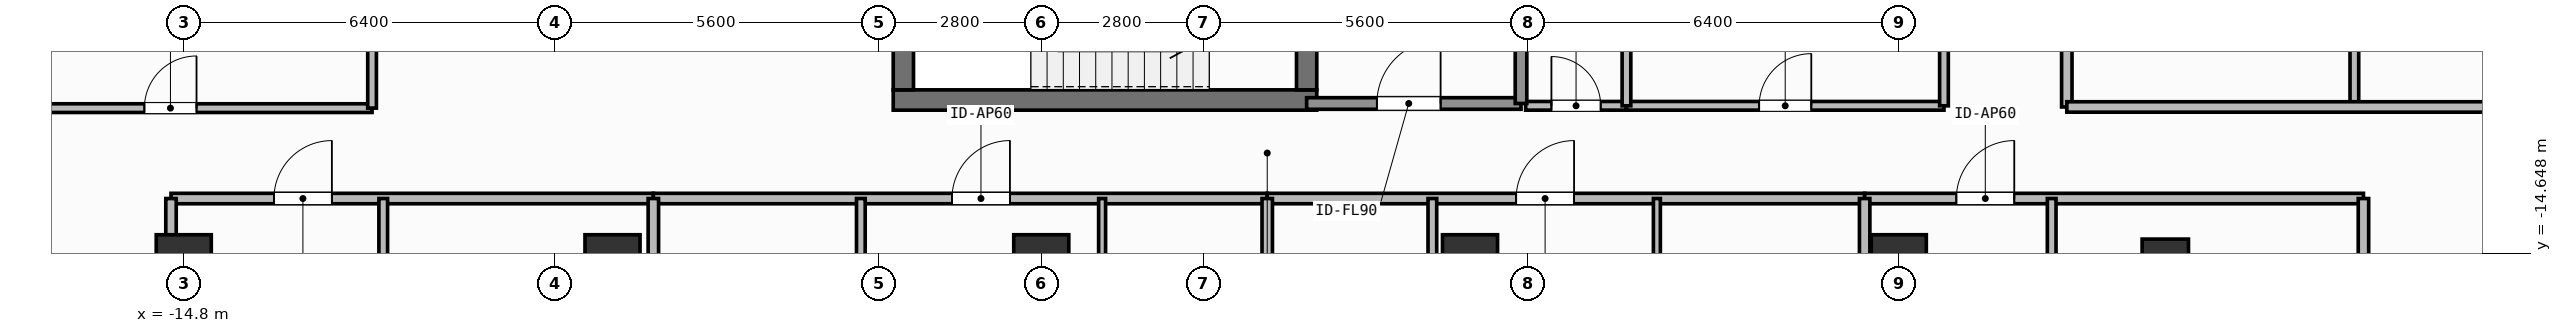
"""IFC4 building model, lengths in metres.
Left out: names, types, materials, properties, quantities, classifications, styles, units other than length and angle.
Written with IfcOpenShell. Run it as: python <this file> out.ifc"""

import sys

from ifc_helpers import new_model, si_unit, direction, frame, frame_2d, origin, origin_2d, place, context, subcontext, project, spatial, rectangle, hollow_rectangle, extrude, element, fill, save


model = new_model("IFC4")
c1 = context("Model", 3, precision=1e-05, world=origin(), true_north=direction((0.0, 1.0)))
c2 = subcontext(c1, "Body", "Model", "MODEL_VIEW")
j1 = project(units=[si_unit("LENGTHUNIT", "METRE"), si_unit("PLANEANGLEUNIT", "RADIAN")], contexts=[c1])
p1 = place(None, origin())
s1 = spatial("IfcSite", under=j1, at=p1, CompositionType="ELEMENT")
p2 = place(p1, origin())
s2 = spatial("IfcBuilding", under=s1, at=p2, CompositionType="ELEMENT")
p3 = place(p2, frame((0.0, 0.0, 250.8)))
s3 = spatial("IfcBuildingStorey", under=s2, at=p3, CompositionType="ELEMENT", Elevation=250.8)
p4 = place(p3, frame((-2.555, -12.0, 0.0), z_axis=(0.0, 0.0, 1.0), x_axis=(1.0, 0.0, 0.0)))
e1 = element("IfcWall", 1, at=p4, inside=s3, PredefinedType="SHEAR", context=c2, shape_type="SweptSolid", body=[
    extrude(rectangle(XDim=7.31, YDim=0.35, at=frame_2d((3.655, 0.0))), origin(), (0.0, 0.0, 1.0), 3.9),
])
p5 = place(p3, frame((-2.38, -11.825, 0.0), z_axis=(0.0, 0.0, 1.0), x_axis=(0.0, 1.0, 0.0)))
e2 = element("IfcWall", 2, at=p5, inside=s3, PredefinedType="SHEAR", context=c2, shape_type="SweptSolid", body=[
    extrude(rectangle(XDim=2.925, YDim=0.35, at=frame_2d((1.462, 0.0))), origin(), (0.0, 0.0, 1.0), 3.9),
])
p6 = place(p3, frame((4.58, -8.9, 0.0), z_axis=(0.0, 0.0, 1.0), x_axis=(0.0, -1.0, 0.0)))
e3 = element("IfcWall", 3, at=p6, inside=s3, PredefinedType="SHEAR", context=c2, shape_type="SweptSolid", body=[
    extrude(rectangle(XDim=2.925, YDim=0.35, at=frame_2d((1.462, 0.0))), origin(), (0.0, 0.0, 1.0), 3.9),
])
p7 = place(p6, frame((0.913, 0.0, 0.0)))
e4 = element("IfcOpeningElement", 4, at=p7, cuts=e3, PredefinedType="OPENING", context=c2, shape_type="SweptSolid", body=[
    extrude(rectangle(XDim=1.1, YDim=2.15, at=frame_2d((0.55, 1.075))), frame((0.0, 0.185, 0.0), z_axis=(0.0, -1.0, 0.0), x_axis=(1.0, 0.0, 0.0)), (0.0, 0.0, 1.0), 0.37),
])
for number, where, z_axis, x_axis in (
    (5, (-14.8, -14.8, 0.0), (0.0, 0.0, 1.0), (1.0, 0.0, 0.0)),
    (6, (-7.4, -14.8, 0.0), (0.0, 0.0, 1.0), (1.0, 0.0, 0.0)),
    (7, (0.0, -14.8, 0.0), (0.0, 0.0, 1.0), (1.0, 0.0, 0.0)),
    (8, (7.4, -14.8, 0.0), (0.0, 0.0, 1.0), (1.0, 0.0, 0.0)),
    (9, (14.8, -14.8, 0.0), (0.0, 0.0, 1.0), (1.0, 0.0, 0.0)),
):
    element("IfcColumn", number, at=place(p3, frame(where, z_axis=z_axis, x_axis=x_axis)), inside=s3, PredefinedType="COLUMN", context=c2, shape_type="SweptSolid", body=[
        extrude(rectangle(XDim=0.95, YDim=0.95, at=origin_2d()), origin(), (0.0, 0.0, 1.0), 3.9),
    ])
p8 = place(p3, frame((19.4, -14.8, 0.0), z_axis=(0.0, 0.0, 1.0), x_axis=(1.0, 0.0, 0.0)))
e10 = element("IfcColumn", 10, at=p8, inside=s3, PredefinedType="COLUMN", context=c2, shape_type="SweptSolid", body=[
    extrude(hollow_rectangle(XDim=0.8, YDim=0.8, WallThickness=0.036, at=origin_2d()), origin(), (0.0, 0.0, 1.0), 3.9),
])
p9 = place(p3, frame((4.58, -12.06, 0.0), z_axis=(0.0, 0.0, 1.0), x_axis=(1.0, 0.0, 0.0)))
e11 = element("IfcWall", 11, at=p9, inside=s3, PredefinedType="SOLIDWALL", context=c2, shape_type="SweptSolid", body=[
    extrude(rectangle(XDim=3.7, YDim=0.2, at=frame_2d((1.85, 0.0))), origin(), (0.0, 0.0, 1.0), 3.62),
])
p10 = place(p9, frame((1.212, 0.0, 0.0)))
e12 = element("IfcOpeningElement", 12, at=p10, cuts=e11, PredefinedType="OPENING", context=c2, shape_type="SweptSolid", body=[
    extrude(rectangle(XDim=1.1, YDim=2.15, at=frame_2d((0.55, 1.075))), frame((0.0, 0.11, 0.0), z_axis=(0.0, -1.0, 0.0), x_axis=(1.0, 0.0, 0.0)), (0.0, 0.0, 1.0), 0.22),
])
p11 = place(p3, frame((8.36, -12.1, 0.0), z_axis=(0.0, 0.0, 1.0), x_axis=(1.0, 0.0, 0.0)))
e13 = element("IfcWall", 13, at=p11, inside=s3, PredefinedType="PARTITIONING", context=c2, shape_type="SweptSolid", body=[
    extrude(rectangle(XDim=1.74, YDim=0.15, at=frame_2d((0.87, 0.0))), origin(), (0.0, 0.0, 1.0), 3.62),
])
p12 = place(p11, frame((0.445, 0.0, 0.0)))
e14 = element("IfcOpeningElement", 14, at=p12, cuts=e13, PredefinedType="OPENING", context=c2, shape_type="SweptSolid", body=[
    extrude(rectangle(XDim=0.85, YDim=2.1, at=frame_2d((0.425, 1.05))), frame((0.0, 0.085, 0.0), z_axis=(0.0, -1.0, 0.0), x_axis=(1.0, 0.0, 0.0)), (0.0, 0.0, 1.0), 0.17),
])
p13 = place(p3, frame((10.1, -12.1, 0.0), z_axis=(0.0, 0.0, 1.0), x_axis=(1.0, 0.0, 0.0)))
e15 = element("IfcWall", 15, at=p13, inside=s3, PredefinedType="PARTITIONING", context=c2, shape_type="SweptSolid", body=[
    extrude(rectangle(XDim=5.48, YDim=0.15, at=frame_2d((2.74, 0.0))), origin(), (0.0, 0.0, 1.0), 3.62),
])
p14 = place(p13, frame((2.29, 0.0, 0.0)))
e16 = element("IfcOpeningElement", 16, at=p14, cuts=e15, PredefinedType="OPENING", context=c2, shape_type="SweptSolid", body=[
    extrude(rectangle(XDim=0.9, YDim=2.1, at=frame_2d((0.45, 1.05))), frame((0.0, 0.085, 0.0), z_axis=(0.0, -1.0, 0.0), x_axis=(1.0, 0.0, 0.0)), (0.0, 0.0, 1.0), 0.17),
])
p15 = place(p3, frame((-15.02, -13.7, 0.0), z_axis=(0.0, 0.0, 1.0), x_axis=(1.0, 0.0, 0.0)))
e17 = element("IfcWall", 17, at=p15, inside=s3, PredefinedType="PARTITIONING", context=c2, shape_type="SweptSolid", body=[
    extrude(rectangle(XDim=8.325, YDim=0.18, at=frame_2d((4.163, 0.0))), origin(), (0.0, 0.0, 1.0), 3.62),
])
p16 = place(p15, frame((1.777, 0.0, 0.0)))
e18 = element("IfcOpeningElement", 18, at=p16, cuts=e17, PredefinedType="OPENING", context=c2, shape_type="SweptSolid", body=[
    extrude(rectangle(XDim=1.0, YDim=2.2, at=frame_2d((0.5, 1.1))), frame((0.0, 0.1, 0.0), z_axis=(0.0, -1.0, 0.0), x_axis=(1.0, 0.0, 0.0)), (0.0, 0.0, 1.0), 0.2),
])
p17 = place(p3, frame((-11.357, -20.422, 0.0), z_axis=(0.0, 0.0, 1.0), x_axis=(0.0, 1.0, 0.0)))
e19 = element("IfcWall", 19, at=p17, inside=s3, PredefinedType="PARTITIONING", context=c2, shape_type="SweptSolid", body=[
    extrude(rectangle(XDim=6.722, YDim=0.15, at=frame_2d((3.361, 0.0))), origin(), (0.0, 0.0, 1.0), 3.62),
])
p18 = place(p17, frame((2.846, 0.0, 0.0)))
e20 = element("IfcOpeningElement", 20, at=p18, cuts=e19, PredefinedType="OPENING", context=c2, shape_type="SweptSolid", body=[
    extrude(rectangle(XDim=0.85, YDim=2.1, at=frame_2d((0.425, 1.05))), frame((0.0, 0.085, 0.0), z_axis=(0.0, -1.0, 0.0), x_axis=(1.0, 0.0, 0.0)), (0.0, 0.0, 1.0), 0.17),
])
p19 = place(p3, frame((-6.695, -13.7, 0.0), z_axis=(0.0, 0.0, 1.0), x_axis=(1.0, 0.0, 0.0)))
e21 = element("IfcWall", 21, at=p19, inside=s3, PredefinedType="PARTITIONING", context=c2, shape_type="SweptSolid", body=[
    extrude(rectangle(XDim=10.595, YDim=0.18, at=frame_2d((5.297, 0.0))), origin(), (0.0, 0.0, 1.0), 3.62),
])
p20 = place(p19, frame((5.154, 0.0, 0.0)))
e22 = element("IfcOpeningElement", 22, at=p20, cuts=e21, PredefinedType="OPENING", context=c2, shape_type="SweptSolid", body=[
    extrude(rectangle(XDim=1.0, YDim=2.2, at=frame_2d((0.5, 1.1))), frame((0.0, 0.1, 0.0), z_axis=(0.0, -1.0, 0.0), x_axis=(1.0, 0.0, 0.0)), (0.0, 0.0, 1.0), 0.2),
])
p21 = place(p3, frame((-3.114, -24.39, 0.0), z_axis=(0.0, 0.0, 1.0), x_axis=(0.0, 1.0, 0.0)))
e23 = element("IfcWall", 23, at=p21, inside=s3, PredefinedType="PARTITIONING", context=c2, shape_type="SweptSolid", body=[
    extrude(rectangle(XDim=10.69, YDim=0.15, at=frame_2d((5.345, 0.0))), origin(), (0.0, 0.0, 1.0), 3.62),
])
p22 = place(p21, frame((4.83, 0.0, 0.0)))
e24 = element("IfcOpeningElement", 24, at=p22, cuts=e23, PredefinedType="OPENING", context=c2, shape_type="SweptSolid", body=[
    extrude(rectangle(XDim=0.85, YDim=2.1, at=frame_2d((0.425, 1.05))), frame((0.0, 0.085, 0.0), z_axis=(0.0, -1.0, 0.0), x_axis=(1.0, 0.0, 0.0)), (0.0, 0.0, 1.0), 0.17),
])
p23 = place(p3, frame((1.05, -21.183, 0.0), z_axis=(0.0, 0.0, 1.0), x_axis=(0.0, 1.0, 0.0)))
e25 = element("IfcWall", 25, at=p23, inside=s3, PredefinedType="PARTITIONING", context=c2, shape_type="SweptSolid", body=[
    extrude(rectangle(XDim=7.483, YDim=0.12, at=frame_2d((3.742, 0.0))), origin(), (0.0, 0.0, 1.0), 3.62),
])
p24 = place(p23, frame((3.316, 0.0, 0.0)))
e26 = element("IfcOpeningElement", 26, at=p24, cuts=e25, PredefinedType="OPENING", context=c2, shape_type="SweptSolid", body=[
    extrude(rectangle(XDim=0.85, YDim=2.1, at=frame_2d((0.425, 1.05))), frame((0.0, 0.07, 0.0), z_axis=(0.0, -1.0, 0.0), x_axis=(1.0, 0.0, 0.0)), (0.0, 0.0, 1.0), 0.14),
])
p25 = place(p3, frame((3.9, -13.7, 0.0), z_axis=(0.0, 0.0, 1.0), x_axis=(1.0, 0.0, 0.0)))
e27 = element("IfcWall", 27, at=p25, inside=s3, PredefinedType="PARTITIONING", context=c2, shape_type="SweptSolid", body=[
    extrude(rectangle(XDim=10.311, YDim=0.18, at=frame_2d((5.156, 0.0))), origin(), (0.0, 0.0, 1.0), 3.62),
])
p26 = place(p25, frame((4.296, 0.0, 0.0)))
e28 = element("IfcOpeningElement", 28, at=p26, cuts=e27, PredefinedType="OPENING", context=c2, shape_type="SweptSolid", body=[
    extrude(rectangle(XDim=1.0, YDim=2.2, at=frame_2d((0.5, 1.1))), frame((0.0, 0.1, 0.0), z_axis=(0.0, -1.0, 0.0), x_axis=(1.0, 0.0, 0.0)), (0.0, 0.0, 1.0), 0.2),
])
p27 = place(p3, frame((6.75, -24.39, 0.0), z_axis=(0.0, 0.0, 1.0), x_axis=(0.0, 1.0, 0.0)))
e29 = element("IfcWall", 29, at=p27, inside=s3, PredefinedType="PARTITIONING", context=c2, shape_type="SweptSolid", body=[
    extrude(rectangle(XDim=10.69, YDim=0.15, at=frame_2d((5.345, 0.0))), origin(), (0.0, 0.0, 1.0), 3.62),
])
p28 = place(p27, frame((5.369, 0.0, 0.0)))
e30 = element("IfcOpeningElement", 30, at=p28, cuts=e29, PredefinedType="OPENING", context=c2, shape_type="SweptSolid", body=[
    extrude(rectangle(XDim=0.85, YDim=2.1, at=frame_2d((0.425, 1.05))), frame((0.0, 0.085, 0.0), z_axis=(0.0, -1.0, 0.0), x_axis=(1.0, 0.0, 0.0)), (0.0, 0.0, 1.0), 0.17),
])
p29 = place(p3, frame((10.625, -21.183, 0.0), z_axis=(0.0, 0.0, 1.0), x_axis=(0.0, 1.0, 0.0)))
e31 = element("IfcWall", 31, at=p29, inside=s3, PredefinedType="PARTITIONING", context=c2, shape_type="SweptSolid", body=[
    extrude(rectangle(XDim=7.483, YDim=0.12, at=frame_2d((3.742, 0.0))), origin(), (0.0, 0.0, 1.0), 3.62),
])
p30 = place(p29, frame((3.316, 0.0, 0.0)))
e32 = element("IfcOpeningElement", 32, at=p30, cuts=e31, PredefinedType="OPENING", context=c2, shape_type="SweptSolid", body=[
    extrude(rectangle(XDim=0.85, YDim=2.1, at=frame_2d((0.425, 1.05))), frame((0.0, 0.07, 0.0), z_axis=(0.0, -1.0, 0.0), x_axis=(1.0, 0.0, 0.0)), (0.0, 0.0, 1.0), 0.14),
])
p31 = place(p3, frame((14.211, -13.7, 0.0), z_axis=(0.0, 0.0, 1.0), x_axis=(1.0, 0.0, 0.0)))
e33 = element("IfcWall", 33, at=p31, inside=s3, PredefinedType="PARTITIONING", context=c2, shape_type="SweptSolid", body=[
    extrude(rectangle(XDim=8.609, YDim=0.18, at=frame_2d((4.305, 0.0))), origin(), (0.0, 0.0, 1.0), 3.62),
])
p32 = place(p31, frame((1.582, 0.0, 0.0)))
e34 = element("IfcOpeningElement", 34, at=p32, cuts=e33, PredefinedType="OPENING", context=c2, shape_type="SweptSolid", body=[
    extrude(rectangle(XDim=1.0, YDim=2.2, at=frame_2d((0.5, 1.1))), frame((0.0, 0.1, 0.0), z_axis=(0.0, -1.0, 0.0), x_axis=(1.0, 0.0, 0.0)), (0.0, 0.0, 1.0), 0.2),
])
p33 = place(p3, frame((17.439, -21.468, 0.0), z_axis=(0.0, 0.0, 1.0), x_axis=(0.0, 1.0, 0.0)))
e35 = element("IfcWall", 35, at=p33, inside=s3, PredefinedType="PARTITIONING", context=c2, shape_type="SweptSolid", body=[
    extrude(rectangle(XDim=7.768, YDim=0.15, at=frame_2d((3.884, 0.0))), origin(), (0.0, 0.0, 1.0), 3.62),
])
p34 = place(p33, frame((3.37, 0.0, 0.0)))
e36 = element("IfcOpeningElement", 36, at=p34, cuts=e35, PredefinedType="OPENING", context=c2, shape_type="SweptSolid", body=[
    extrude(rectangle(XDim=0.85, YDim=2.1, at=frame_2d((0.425, 1.05))), frame((0.0, 0.085, 0.0), z_axis=(0.0, -1.0, 0.0), x_axis=(1.0, 0.0, 0.0)), (0.0, 0.0, 1.0), 0.17),
])
p35 = place(p3, frame((-18.33, -12.14, 0.0), z_axis=(0.0, 0.0, 1.0), x_axis=(1.0, 0.0, 0.0)))
e37 = element("IfcWall", 37, at=p35, inside=s3, PredefinedType="PARTITIONING", context=c2, shape_type="SweptSolid", body=[
    extrude(rectangle(XDim=6.78, YDim=0.15, at=frame_2d((3.39, 0.0))), origin(), (0.0, 0.0, 1.0), 3.62),
])
p36 = place(p35, frame((2.85, 0.0, 0.0)))
e38 = element("IfcOpeningElement", 38, at=p36, cuts=e37, PredefinedType="OPENING", context=c2, shape_type="SweptSolid", body=[
    extrude(rectangle(XDim=0.9, YDim=2.1, at=frame_2d((0.45, 1.05))), frame((0.0, 0.085, 0.0), z_axis=(0.0, -1.0, 0.0), x_axis=(1.0, 0.0, 0.0)), (0.0, 0.0, 1.0), 0.17),
])
p37 = place(p3, frame((17.7, -12.12, 0.0), z_axis=(0.0, 0.0, 1.0), x_axis=(0.0, 1.0, 0.0)))
e39 = element("IfcWall", 39, at=p37, inside=s3, PredefinedType="PARTITIONING", context=c2, shape_type="SweptSolid", body=[
    extrude(rectangle(XDim=23.55, YDim=0.18, at=frame_2d((11.775, 0.0))), origin(), (0.0, 0.0, 1.0), 3.62),
])
p38 = place(p37, frame((11.454, 0.0, 0.0)))
e40 = element("IfcOpeningElement", 40, at=p38, cuts=e39, PredefinedType="OPENING", context=c2, shape_type="SweptSolid", body=[
    extrude(rectangle(XDim=1.0, YDim=2.2, at=frame_2d((0.5, 1.1))), frame((0.0, 0.1, 0.0), z_axis=(0.0, -1.0, 0.0), x_axis=(1.0, 0.0, 0.0)), (0.0, 0.0, 1.0), 0.2),
])
p39 = place(p3, frame((8.28, -12.06, 0.0), z_axis=(0.0, 0.0, 1.0), x_axis=(0.0, 1.0, 0.0)))
e41 = element("IfcWall", 41, at=p39, inside=s3, PredefinedType="SOLIDWALL", context=c2, shape_type="SweptSolid", body=[
    extrude(rectangle(XDim=3.335, YDim=0.2, at=frame_2d((1.667, 0.0))), origin(), (0.0, 0.0, 1.0), 3.62),
])
p40 = place(p3, frame((10.1, -12.1, 0.0), z_axis=(0.0, 0.0, 1.0), x_axis=(0.0, 1.0, 0.0)))
e42 = element("IfcWall", 42, at=p40, inside=s3, PredefinedType="PARTITIONING", context=c2, shape_type="SweptSolid", body=[
    extrude(rectangle(XDim=2.35, YDim=0.15, at=frame_2d((1.175, 0.0))), origin(), (0.0, 0.0, 1.0), 3.62),
])
p41 = place(p3, frame((15.58, -12.1, 0.0), z_axis=(0.0, 0.0, 1.0), x_axis=(0.0, 1.0, 0.0)))
e43 = element("IfcWall", 43, at=p41, inside=s3, PredefinedType="PARTITIONING", context=c2, shape_type="SweptSolid", body=[
    extrude(rectangle(XDim=6.25, YDim=0.15, at=frame_2d((3.125, 0.0))), origin(), (0.0, 0.0, 1.0), 3.62),
])
for number, where, z_axis, x_axis in (
    (44, (-6.695, -28.63, 0.0), (0.0, 0.0, 1.0), (0.0, 1.0, 0.0)),
    (45, (3.9, -28.63, 0.0), (0.0, 0.0, 1.0), (0.0, 1.0, 0.0)),
    (46, (14.211, -28.63, 0.0), (0.0, 0.0, 1.0), (0.0, 1.0, 0.0)),
):
    element("IfcWall", number, at=place(p3, frame(where, z_axis=z_axis, x_axis=x_axis)), inside=s3, PredefinedType="PARTITIONING", context=c2, shape_type="SweptSolid", body=[
        extrude(rectangle(XDim=14.93, YDim=0.18, at=frame_2d((7.465, 0.0))), origin(), (0.0, 0.0, 1.0), 3.62),
    ])
for number, where, z_axis, x_axis in (
    (47, (-15.02, -27.51, 0.0), (0.0, 0.0, 1.0), (0.0, 1.0, 0.0)),
    (48, (22.82, -27.51, 0.0), (0.0, 0.0, 1.0), (0.0, 1.0, 0.0)),
):
    element("IfcWall", number, at=place(p3, frame(where, z_axis=z_axis, x_axis=x_axis)), inside=s3, PredefinedType="PARTITIONING", context=c2, shape_type="SweptSolid", body=[
        extrude(rectangle(XDim=13.81, YDim=0.18, at=frame_2d((6.905, 0.0))), origin(), (0.0, 0.0, 1.0), 3.62),
    ])
p42 = place(p3, frame((-11.55, -12.14, 0.0), z_axis=(0.0, 0.0, 1.0), x_axis=(0.0, 1.0, 0.0)))
e49 = element("IfcWall", 49, at=p42, inside=s3, PredefinedType="PARTITIONING", context=c2, shape_type="SweptSolid", body=[
    extrude(rectangle(XDim=16.24, YDim=0.15, at=frame_2d((8.12, 0.0))), origin(), (0.0, 0.0, 1.0), 3.62),
])
p43 = place(p3, frame((22.663, -12.12, 0.0), z_axis=(0.0, 0.0, 1.0), x_axis=(0.0, 1.0, 0.0)))
e50 = element("IfcWall", 50, at=p43, inside=s3, PredefinedType="PARTITIONING", context=c2, shape_type="SweptSolid", body=[
    extrude(rectangle(XDim=6.704, YDim=0.15, at=frame_2d((3.352, 0.0))), origin(), (0.0, 0.0, 1.0), 3.62),
])
p44 = place(p3, frame((17.7, -12.12, 0.0), z_axis=(0.0, 0.0, 1.0), x_axis=(1.0, 0.0, 0.0)))
e51 = element("IfcWall", 51, at=p44, inside=s3, PredefinedType="PARTITIONING", context=c2, shape_type="SweptSolid", body=[
    extrude(rectangle(XDim=8.43, YDim=0.18, at=frame_2d((4.215, 0.0))), origin(), (0.0, 0.0, 1.0), 3.62),
])
p45 = place(p10, origin())
e52 = element("IfcDoor", 52, at=p45, inside=s3, OperationType="SINGLE_SWING_RIGHT", PredefinedType="DOOR", context=c2, shape_type="SweptSolid", body=[
    extrude(rectangle(XDim=1.1, YDim=2.15, at=frame_2d((0.55, 1.075))), frame((0.0, 0.025, 0.0), z_axis=(0.0, -1.0, 0.0), x_axis=(1.0, 0.0, 0.0)), (0.0, 0.0, 1.0), 0.05),
])
fill(e12, e52)
p46 = place(p12, origin())
e53 = element("IfcDoor", 53, at=p46, inside=s3, OperationType="SINGLE_SWING_LEFT", PredefinedType="DOOR", context=c2, shape_type="SweptSolid", body=[
    extrude(rectangle(XDim=0.85, YDim=2.1, at=frame_2d((0.425, 1.05))), frame((0.0, 0.025, 0.0), z_axis=(0.0, -1.0, 0.0), x_axis=(1.0, 0.0, 0.0)), (0.0, 0.0, 1.0), 0.05),
])
fill(e14, e53)
p47 = place(p14, origin())
e54 = element("IfcDoor", 54, at=p47, inside=s3, OperationType="SINGLE_SWING_RIGHT", PredefinedType="DOOR", context=c2, shape_type="SweptSolid", body=[
    extrude(rectangle(XDim=0.9, YDim=2.1, at=frame_2d((0.45, 1.05))), frame((0.0, 0.025, 0.0), z_axis=(0.0, -1.0, 0.0), x_axis=(1.0, 0.0, 0.0)), (0.0, 0.0, 1.0), 0.05),
])
fill(e16, e54)
p48 = place(p16, origin())
e55 = element("IfcDoor", 55, at=p48, inside=s3, OperationType="SINGLE_SWING_RIGHT", PredefinedType="DOOR", context=c2, shape_type="SweptSolid", body=[
    extrude(rectangle(XDim=1.0, YDim=2.2, at=frame_2d((0.5, 1.1))), frame((0.0, 0.025, 0.0), z_axis=(0.0, -1.0, 0.0), x_axis=(1.0, 0.0, 0.0)), (0.0, 0.0, 1.0), 0.05),
])
fill(e18, e55)
p49 = place(p20, origin())
e56 = element("IfcDoor", 56, at=p49, inside=s3, OperationType="SINGLE_SWING_RIGHT", PredefinedType="DOOR", context=c2, shape_type="SweptSolid", body=[
    extrude(rectangle(XDim=1.0, YDim=2.2, at=frame_2d((0.5, 1.1))), frame((0.0, 0.025, 0.0), z_axis=(0.0, -1.0, 0.0), x_axis=(1.0, 0.0, 0.0)), (0.0, 0.0, 1.0), 0.05),
])
fill(e22, e56)
p50 = place(p26, origin())
e57 = element("IfcDoor", 57, at=p50, inside=s3, OperationType="SINGLE_SWING_RIGHT", PredefinedType="DOOR", context=c2, shape_type="SweptSolid", body=[
    extrude(rectangle(XDim=1.0, YDim=2.2, at=frame_2d((0.5, 1.1))), frame((0.0, 0.025, 0.0), z_axis=(0.0, -1.0, 0.0), x_axis=(1.0, 0.0, 0.0)), (0.0, 0.0, 1.0), 0.05),
])
fill(e28, e57)
p51 = place(p32, origin())
e58 = element("IfcDoor", 58, at=p51, inside=s3, OperationType="SINGLE_SWING_RIGHT", PredefinedType="DOOR", context=c2, shape_type="SweptSolid", body=[
    extrude(rectangle(XDim=1.0, YDim=2.2, at=frame_2d((0.5, 1.1))), frame((0.0, 0.025, 0.0), z_axis=(0.0, -1.0, 0.0), x_axis=(1.0, 0.0, 0.0)), (0.0, 0.0, 1.0), 0.05),
])
fill(e34, e58)
p52 = place(p36, origin())
e59 = element("IfcDoor", 59, at=p52, inside=s3, OperationType="SINGLE_SWING_RIGHT", PredefinedType="DOOR", context=c2, shape_type="SweptSolid", body=[
    extrude(rectangle(XDim=0.9, YDim=2.1, at=frame_2d((0.45, 1.05))), frame((0.0, 0.025, 0.0), z_axis=(0.0, -1.0, 0.0), x_axis=(1.0, 0.0, 0.0)), (0.0, 0.0, 1.0), 0.05),
])
fill(e38, e59)
save(model, sys.argv[1])
